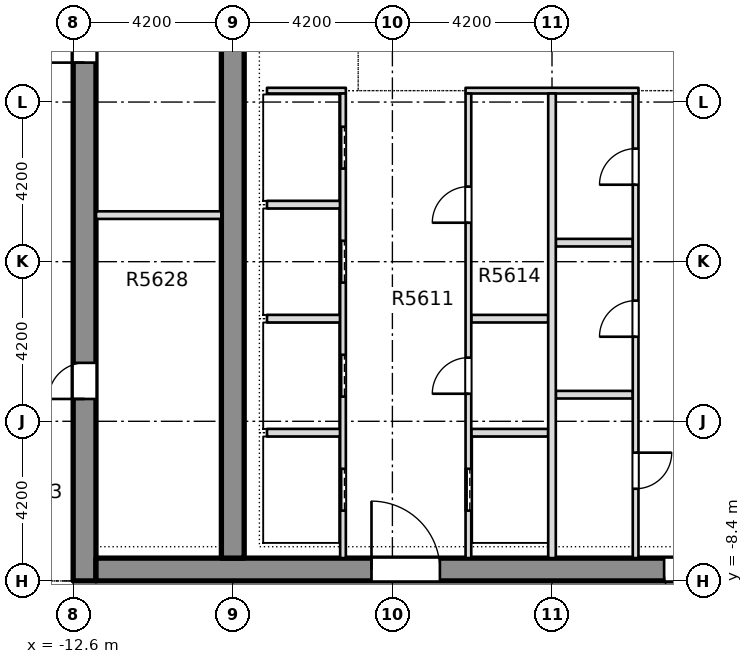
"""IFC4 building model, lengths in metres.
Left out: names, types, materials, properties, quantities, classifications, styles, units other than length and angle.
Written with IfcOpenShell. Run it as: python <this file> out.ifc"""

import sys

from ifc_helpers import new_model, si_unit, direction, frame, frame_2d, origin, place, context, subcontext, project, spatial, rectangle, extrude, element, fill, save


model = new_model("IFC4")
c1 = context("Model", 3, precision=1e-05, world=origin(), true_north=direction((0.0, 1.0)))
c2 = subcontext(c1, "Body", "Model", "MODEL_VIEW")
j1 = project(units=[si_unit("LENGTHUNIT", "METRE"), si_unit("PLANEANGLEUNIT", "RADIAN")], contexts=[c1])
p1 = place(None, origin())
s1 = spatial("IfcSite", under=j1, at=p1, CompositionType="ELEMENT")
p2 = place(p1, origin())
s2 = spatial("IfcBuilding", under=s1, at=p2, CompositionType="ELEMENT")
p3 = place(p2, frame((0.0, 0.0, 213.5)))
s3 = spatial("IfcBuildingStorey", under=s2, at=p3, CompositionType="ELEMENT", Elevation=213.5)
p4 = place(p3, frame((-12.3, -8.4, -0.4), z_axis=(0.0, 0.0, 1.0), x_axis=(0.0, 1.0, 0.0)))
e1 = element("IfcWall", 1, at=p4, inside=s3, PredefinedType="SHEAR", context=c2, shape_type="SweptSolid", body=[
    extrude(rectangle(XDim=30.15, YDim=0.6, at=frame_2d((15.075, 0.0))), origin(), (0.0, 0.0, 1.0), 3.4),
])
p5 = place(p4, frame((4.788, 0.0, 0.4)))
e2 = element("IfcOpeningElement", 2, at=p5, cuts=e1, PredefinedType="OPENING", context=c2, shape_type="SweptSolid", body=[
    extrude(rectangle(XDim=0.95, YDim=2.1, at=frame_2d((0.475, 1.05))), frame((0.0, 0.31, 0.0), z_axis=(0.0, -1.0, 0.0), x_axis=(1.0, 0.0, 0.0)), (0.0, 0.0, 1.0), 0.62),
])
p6 = place(p4, frame((13.638, 0.0, 0.4)))
e3 = element("IfcOpeningElement", 3, at=p6, cuts=e1, PredefinedType="OPENING", context=c2, shape_type="SweptSolid", body=[
    extrude(rectangle(XDim=0.95, YDim=2.1, at=frame_2d((0.475, 1.05))), frame((0.0, 0.31, 0.0), z_axis=(0.0, -1.0, 0.0), x_axis=(1.0, 0.0, 0.0)), (0.0, 0.0, 1.0), 0.62),
])
p7 = place(p4, frame((21.771, 0.0, 0.4)))
e4 = element("IfcOpeningElement", 4, at=p7, cuts=e1, PredefinedType="OPENING", context=c2, shape_type="SweptSolid", body=[
    extrude(rectangle(XDim=0.95, YDim=2.1, at=frame_2d((0.475, 1.05))), frame((0.0, 0.31, 0.0), z_axis=(0.0, -1.0, 0.0), x_axis=(1.0, 0.0, 0.0)), (0.0, 0.0, 1.0), 0.62),
])
p8 = place(p4, frame((24.576, 0.0, 0.4)))
e5 = element("IfcOpeningElement", 5, at=p8, cuts=e1, PredefinedType="OPENING", context=c2, shape_type="SweptSolid", body=[
    extrude(rectangle(XDim=0.95, YDim=2.1, at=frame_2d((0.475, 1.05))), frame((0.0, 0.31, 0.0), z_axis=(0.0, -1.0, 0.0), x_axis=(1.0, 0.0, 0.0)), (0.0, 0.0, 1.0), 0.62),
])
p9 = place(p4, frame((27.555, 0.0, 0.4)))
e6 = element("IfcOpeningElement", 6, at=p9, cuts=e1, PredefinedType="OPENING", context=c2, shape_type="SweptSolid", body=[
    extrude(rectangle(XDim=0.95, YDim=2.1, at=frame_2d((0.475, 1.05))), frame((0.0, 0.31, 0.0), z_axis=(0.0, -1.0, 0.0), x_axis=(1.0, 0.0, 0.0)), (0.0, 0.0, 1.0), 0.62),
])
p10 = place(p4, frame((19.3, 0.0, 0.4)))
e7 = element("IfcOpeningElement", 7, at=p10, cuts=e1, PredefinedType="OPENING", context=c2, shape_type="SweptSolid", body=[
    extrude(rectangle(XDim=1.2, YDim=2.1, at=frame_2d((0.6, 1.05))), frame((0.0, 0.31, 0.0), z_axis=(0.0, -1.0, 0.0), x_axis=(1.0, 0.0, 0.0)), (0.0, 0.0, 1.0), 0.62),
])
p11 = place(p3, frame((-12.0, -8.1, -0.4), z_axis=(0.0, 0.0, 1.0), x_axis=(1.0, 0.0, 0.0)))
e8 = element("IfcWall", 8, at=p11, inside=s3, PredefinedType="SHEAR", context=c2, shape_type="SweptSolid", body=[
    extrude(rectangle(XDim=24.0, YDim=0.6, at=frame_2d((12.0, 0.0))), origin(), (0.0, 0.0, 1.0), 3.4),
])
p12 = place(p11, frame((7.25, 0.0, 0.4)))
e9 = element("IfcOpeningElement", 9, at=p12, cuts=e8, PredefinedType="OPENING", context=c2, shape_type="SweptSolid", body=[
    extrude(rectangle(XDim=1.8, YDim=2.1, at=frame_2d((0.9, 1.05))), frame((0.0, 0.31, 0.0), z_axis=(0.0, -1.0, 0.0), x_axis=(1.0, 0.0, 0.0)), (0.0, 0.0, 1.0), 0.62),
])
p13 = place(p11, frame((14.95, 0.0, 0.4)))
e10 = element("IfcOpeningElement", 10, at=p13, cuts=e8, PredefinedType="OPENING", context=c2, shape_type="SweptSolid", body=[
    extrude(rectangle(XDim=1.8, YDim=2.1, at=frame_2d((0.9, 1.05))), frame((0.0, 0.31, 0.0), z_axis=(0.0, -1.0, 0.0), x_axis=(1.0, 0.0, 0.0)), (0.0, 0.0, 1.0), 0.62),
])
p14 = place(p3, frame((-8.4, -7.8, -0.4), z_axis=(0.0, 0.0, 1.0), x_axis=(0.0, 1.0, 0.0)))
e11 = element("IfcWall", 11, at=p14, inside=s3, PredefinedType="SHEAR", context=c2, shape_type="SweptSolid", body=[
    extrude(rectangle(XDim=28.95, YDim=0.6, at=frame_2d((14.475, 0.0))), origin(), (0.0, 0.0, 1.0), 3.4),
])
p15 = place(p14, frame((18.7, 0.0, 0.4)))
e12 = element("IfcOpeningElement", 12, at=p15, cuts=e11, PredefinedType="OPENING", context=c2, shape_type="SweptSolid", body=[
    extrude(rectangle(XDim=1.2, YDim=2.1, at=frame_2d((0.6, 1.05))), frame((0.0, 0.31, 0.0), z_axis=(0.0, -1.0, 0.0), x_axis=(1.0, 0.0, 0.0)), (0.0, 0.0, 1.0), 0.62),
])
p16 = place(p3, frame((-7.5, -4.5, 0.0), z_axis=(0.0, 0.0, 1.0), x_axis=(1.0, 0.0, 0.0)))
e13 = element("IfcWall", 13, at=p16, inside=s3, PredefinedType="PARTITIONING", context=c2, shape_type="SweptSolid", body=[
    extrude(rectangle(XDim=1.925, YDim=0.2, at=frame_2d((0.962, 0.0))), origin(), (0.0, 0.0, 1.0), 3.0),
])
for number, where, z_axis, x_axis in (
    (14, (-2.125, -4.5, 0.0), (0.0, 0.0, 1.0), (1.0, 0.0, 0.0)),
    (15, (0.1, -3.5, 0.0), (0.0, 0.0, 1.0), (1.0, 0.0, 0.0)),
):
    element("IfcWall", number, at=place(p3, frame(where, z_axis=z_axis, x_axis=x_axis)), inside=s3, PredefinedType="PARTITIONING", context=c2, shape_type="SweptSolid", body=[
        extrude(rectangle(XDim=2.025, YDim=0.2, at=frame_2d((1.012, 0.0))), origin(), (0.0, 0.0, 1.0), 3.0),
    ])
p17 = place(p3, frame((-7.5, -1.5, 0.0), z_axis=(0.0, 0.0, 1.0), x_axis=(1.0, 0.0, 0.0)))
e16 = element("IfcWall", 16, at=p17, inside=s3, PredefinedType="PARTITIONING", context=c2, shape_type="SweptSolid", body=[
    extrude(rectangle(XDim=1.925, YDim=0.2, at=frame_2d((0.962, 0.0))), origin(), (0.0, 0.0, 1.0), 3.0),
])
for number, where, z_axis, x_axis in (
    (17, (-2.125, -1.5, 0.0), (0.0, 0.0, 1.0), (1.0, 0.0, 0.0)),
    (18, (0.1, 0.5, 0.0), (0.0, 0.0, 1.0), (1.0, 0.0, 0.0)),
):
    element("IfcWall", number, at=place(p3, frame(where, z_axis=z_axis, x_axis=x_axis)), inside=s3, PredefinedType="PARTITIONING", context=c2, shape_type="SweptSolid", body=[
        extrude(rectangle(XDim=2.025, YDim=0.2, at=frame_2d((1.012, 0.0))), origin(), (0.0, 0.0, 1.0), 3.0),
    ])
p18 = place(p3, frame((-7.5, 1.5, 0.0), z_axis=(0.0, 0.0, 1.0), x_axis=(1.0, 0.0, 0.0)))
e19 = element("IfcWall", 19, at=p18, inside=s3, PredefinedType="PARTITIONING", context=c2, shape_type="SweptSolid", body=[
    extrude(rectangle(XDim=1.925, YDim=0.2, at=frame_2d((0.962, 0.0))), origin(), (0.0, 0.0, 1.0), 3.0),
])
p19 = place(p3, frame((-7.5, 4.5, 0.0), z_axis=(0.0, 0.0, 1.0), x_axis=(1.0, 0.0, 0.0)))
e20 = element("IfcWall", 20, at=p19, inside=s3, PredefinedType="PARTITIONING", context=c2, shape_type="SweptSolid", body=[
    extrude(rectangle(XDim=2.075, YDim=0.15, at=frame_2d((1.038, 0.0))), origin(), (0.0, 0.0, 1.0), 3.0),
])
p20 = place(p3, frame((-2.275, 4.5, 0.0), z_axis=(0.0, 0.0, 1.0), x_axis=(1.0, 0.0, 0.0)))
e21 = element("IfcWall", 21, at=p20, inside=s3, PredefinedType="PARTITIONING", context=c2, shape_type="SweptSolid", body=[
    extrude(rectangle(XDim=4.55, YDim=0.15, at=frame_2d((2.275, 0.0))), origin(), (0.0, 0.0, 1.0), 3.0),
])
p21 = place(p3, frame((-5.5, -7.799, 0.0), z_axis=(0.0, 0.0, 1.0), x_axis=(0.0, 1.0, 0.0)))
e22 = element("IfcWall", 22, at=p21, inside=s3, PredefinedType="PARTITIONING", context=c2, shape_type="SweptSolid", body=[
    extrude(rectangle(XDim=12.224, YDim=0.15, at=frame_2d((6.112, 0.0))), origin(), (0.0, 0.0, 1.0), 3.0),
])
p22 = place(p21, frame((1.249, 0.0, 0.0)))
e23 = element("IfcOpeningElement", 23, at=p22, cuts=e22, PredefinedType="OPENING", context=c2, shape_type="SweptSolid", body=[
    extrude(rectangle(XDim=1.1, YDim=2.1, at=frame_2d((0.55, 1.05))), frame((0.0, 0.085, 0.0), z_axis=(0.0, -1.0, 0.0), x_axis=(1.0, 0.0, 0.0)), (0.0, 0.0, 1.0), 0.17),
])
p23 = place(p21, frame((4.249, 0.0, 0.0)))
e24 = element("IfcOpeningElement", 24, at=p23, cuts=e22, PredefinedType="OPENING", context=c2, shape_type="SweptSolid", body=[
    extrude(rectangle(XDim=1.1, YDim=2.1, at=frame_2d((0.55, 1.05))), frame((0.0, 0.085, 0.0), z_axis=(0.0, -1.0, 0.0), x_axis=(1.0, 0.0, 0.0)), (0.0, 0.0, 1.0), 0.17),
])
p24 = place(p21, frame((7.249, 0.0, 0.0)))
e25 = element("IfcOpeningElement", 25, at=p24, cuts=e22, PredefinedType="OPENING", context=c2, shape_type="SweptSolid", body=[
    extrude(rectangle(XDim=1.1, YDim=2.1, at=frame_2d((0.55, 1.05))), frame((0.0, 0.085, 0.0), z_axis=(0.0, -1.0, 0.0), x_axis=(1.0, 0.0, 0.0)), (0.0, 0.0, 1.0), 0.17),
])
p25 = place(p21, frame((10.249, 0.0, 0.0)))
e26 = element("IfcOpeningElement", 26, at=p25, cuts=e22, PredefinedType="OPENING", context=c2, shape_type="SweptSolid", body=[
    extrude(rectangle(XDim=1.1, YDim=2.1, at=frame_2d((0.55, 1.05))), frame((0.0, 0.085, 0.0), z_axis=(0.0, -1.0, 0.0), x_axis=(1.0, 0.0, 0.0)), (0.0, 0.0, 1.0), 0.17),
])
p26 = place(p3, frame((-2.2, -7.799, 0.0), z_axis=(0.0, 0.0, 1.0), x_axis=(0.0, 1.0, 0.0)))
e27 = element("IfcWall", 27, at=p26, inside=s3, PredefinedType="PARTITIONING", context=c2, shape_type="SweptSolid", body=[
    extrude(rectangle(XDim=12.224, YDim=0.15, at=frame_2d((6.112, 0.0))), origin(), (0.0, 0.0, 1.0), 3.0),
])
p27 = place(p26, frame((1.249, 0.0, 0.0)))
e28 = element("IfcOpeningElement", 28, at=p27, cuts=e27, PredefinedType="OPENING", context=c2, shape_type="SweptSolid", body=[
    extrude(rectangle(XDim=1.1, YDim=2.1, at=frame_2d((0.55, 1.05))), frame((0.0, 0.085, 0.0), z_axis=(0.0, -1.0, 0.0), x_axis=(1.0, 0.0, 0.0)), (0.0, 0.0, 1.0), 0.17),
])
p28 = place(p26, frame((4.324, 0.0, 0.0)))
e29 = element("IfcOpeningElement", 29, at=p28, cuts=e27, PredefinedType="OPENING", context=c2, shape_type="SweptSolid", body=[
    extrude(rectangle(XDim=0.95, YDim=2.1, at=frame_2d((0.475, 1.05))), frame((0.0, 0.085, 0.0), z_axis=(0.0, -1.0, 0.0), x_axis=(1.0, 0.0, 0.0)), (0.0, 0.0, 1.0), 0.17),
])
p29 = place(p26, frame((8.824, 0.0, 0.0)))
e30 = element("IfcOpeningElement", 30, at=p29, cuts=e27, PredefinedType="OPENING", context=c2, shape_type="SweptSolid", body=[
    extrude(rectangle(XDim=0.95, YDim=2.1, at=frame_2d((0.475, 1.05))), frame((0.0, 0.085, 0.0), z_axis=(0.0, -1.0, 0.0), x_axis=(1.0, 0.0, 0.0)), (0.0, 0.0, 1.0), 0.17),
])
p30 = place(p3, frame((0.0, -7.799, 0.0), z_axis=(0.0, 0.0, 1.0), x_axis=(0.0, 1.0, 0.0)))
e31 = element("IfcWall", 31, at=p30, inside=s3, PredefinedType="PARTITIONING", context=c2, shape_type="SweptSolid", body=[
    extrude(rectangle(XDim=12.224, YDim=0.2, at=frame_2d((6.112, 0.0))), origin(), (0.0, 0.0, 1.0), 3.0),
])
p31 = place(p3, frame((2.2, -7.799, 0.0), z_axis=(0.0, 0.0, 1.0), x_axis=(0.0, 1.0, 0.0)))
e32 = element("IfcWall", 32, at=p31, inside=s3, PredefinedType="PARTITIONING", context=c2, shape_type="SweptSolid", body=[
    extrude(rectangle(XDim=12.224, YDim=0.15, at=frame_2d((6.112, 0.0))), origin(), (0.0, 0.0, 1.0), 3.0),
])
p32 = place(p31, frame((1.824, 0.0, 0.0)))
e33 = element("IfcOpeningElement", 33, at=p32, cuts=e32, PredefinedType="OPENING", context=c2, shape_type="SweptSolid", body=[
    extrude(rectangle(XDim=0.95, YDim=2.1, at=frame_2d((0.475, 1.05))), frame((0.0, 0.085, 0.0), z_axis=(0.0, -1.0, 0.0), x_axis=(1.0, 0.0, 0.0)), (0.0, 0.0, 1.0), 0.17),
])
p33 = place(p31, frame((5.824, 0.0, 0.0)))
e34 = element("IfcOpeningElement", 34, at=p33, cuts=e32, PredefinedType="OPENING", context=c2, shape_type="SweptSolid", body=[
    extrude(rectangle(XDim=0.95, YDim=2.1, at=frame_2d((0.475, 1.05))), frame((0.0, 0.085, 0.0), z_axis=(0.0, -1.0, 0.0), x_axis=(1.0, 0.0, 0.0)), (0.0, 0.0, 1.0), 0.17),
])
p34 = place(p31, frame((9.824, 0.0, 0.0)))
e35 = element("IfcOpeningElement", 35, at=p34, cuts=e32, PredefinedType="OPENING", context=c2, shape_type="SweptSolid", body=[
    extrude(rectangle(XDim=0.95, YDim=2.1, at=frame_2d((0.475, 1.05))), frame((0.0, 0.085, 0.0), z_axis=(0.0, -1.0, 0.0), x_axis=(1.0, 0.0, 0.0)), (0.0, 0.0, 1.0), 0.17),
])
p35 = place(p3, frame((-11.999, 1.225, 0.0), z_axis=(0.0, 0.0, 1.0), x_axis=(1.0, 0.0, 0.0)))
e36 = element("IfcWall", 36, at=p35, inside=s3, PredefinedType="PARTITIONING", context=c2, shape_type="SweptSolid", body=[
    extrude(rectangle(XDim=3.298, YDim=0.2, at=frame_2d((1.649, 0.0))), origin(), (0.0, 0.0, 1.0), 3.0),
])
p36 = place(p22, origin())
e37 = element("IfcDoor", 37, at=p36, inside=s3, OperationType="SLIDING_TO_LEFT", PredefinedType="DOOR", context=c2, shape_type="SweptSolid", body=[
    extrude(rectangle(XDim=1.1, YDim=2.1, at=frame_2d((0.55, 1.05))), frame((0.0, 0.025, 0.0), z_axis=(0.0, -1.0, 0.0), x_axis=(1.0, 0.0, 0.0)), (0.0, 0.0, 1.0), 0.05),
])
fill(e23, e37)
p37 = place(p23, origin())
e38 = element("IfcDoor", 38, at=p37, inside=s3, OperationType="SLIDING_TO_LEFT", PredefinedType="DOOR", context=c2, shape_type="SweptSolid", body=[
    extrude(rectangle(XDim=1.1, YDim=2.1, at=frame_2d((0.55, 1.05))), frame((0.0, 0.025, 0.0), z_axis=(0.0, -1.0, 0.0), x_axis=(1.0, 0.0, 0.0)), (0.0, 0.0, 1.0), 0.05),
])
fill(e24, e38)
p38 = place(p24, origin())
e39 = element("IfcDoor", 39, at=p38, inside=s3, OperationType="SLIDING_TO_LEFT", PredefinedType="DOOR", context=c2, shape_type="SweptSolid", body=[
    extrude(rectangle(XDim=1.1, YDim=2.1, at=frame_2d((0.55, 1.05))), frame((0.0, 0.025, 0.0), z_axis=(0.0, -1.0, 0.0), x_axis=(1.0, 0.0, 0.0)), (0.0, 0.0, 1.0), 0.05),
])
fill(e25, e39)
p39 = place(p25, origin())
e40 = element("IfcDoor", 40, at=p39, inside=s3, OperationType="SLIDING_TO_LEFT", PredefinedType="DOOR", context=c2, shape_type="SweptSolid", body=[
    extrude(rectangle(XDim=1.1, YDim=2.1, at=frame_2d((0.55, 1.05))), frame((0.0, 0.025, 0.0), z_axis=(0.0, -1.0, 0.0), x_axis=(1.0, 0.0, 0.0)), (0.0, 0.0, 1.0), 0.05),
])
fill(e26, e40)
p40 = place(p27, origin())
e41 = element("IfcDoor", 41, at=p40, inside=s3, OperationType="SLIDING_TO_LEFT", PredefinedType="DOOR", context=c2, shape_type="SweptSolid", body=[
    extrude(rectangle(XDim=1.1, YDim=2.1, at=frame_2d((0.55, 1.05))), frame((0.0, 0.025, 0.0), z_axis=(0.0, -1.0, 0.0), x_axis=(1.0, 0.0, 0.0)), (0.0, 0.0, 1.0), 0.05),
])
fill(e28, e41)
p41 = place(p28, origin())
e42 = element("IfcDoor", 42, at=p41, inside=s3, OperationType="SINGLE_SWING_RIGHT", PredefinedType="DOOR", context=c2, shape_type="SweptSolid", body=[
    extrude(rectangle(XDim=0.95, YDim=2.1, at=frame_2d((0.475, 1.05))), frame((0.0, 0.025, 0.0), z_axis=(0.0, -1.0, 0.0), x_axis=(1.0, 0.0, 0.0)), (0.0, 0.0, 1.0), 0.05),
])
fill(e29, e42)
p42 = place(p29, origin())
e43 = element("IfcDoor", 43, at=p42, inside=s3, OperationType="SINGLE_SWING_LEFT", PredefinedType="DOOR", context=c2, shape_type="SweptSolid", body=[
    extrude(rectangle(XDim=0.95, YDim=2.1, at=frame_2d((0.475, 1.05))), frame((0.0, 0.025, 0.0), z_axis=(0.0, -1.0, 0.0), x_axis=(1.0, 0.0, 0.0)), (0.0, 0.0, 1.0), 0.05),
])
fill(e30, e43)
p43 = place(p32, origin())
e44 = element("IfcDoor", 44, at=p43, inside=s3, OperationType="SINGLE_SWING_RIGHT", PredefinedType="DOOR", context=c2, shape_type="SweptSolid", body=[
    extrude(rectangle(XDim=0.95, YDim=2.1, at=frame_2d((0.475, 1.05))), frame((0.0, 0.025, 0.0), z_axis=(0.0, -1.0, 0.0), x_axis=(1.0, 0.0, 0.0)), (0.0, 0.0, 1.0), 0.05),
])
fill(e33, e44)
p44 = place(p33, origin())
e45 = element("IfcDoor", 45, at=p44, inside=s3, OperationType="SINGLE_SWING_RIGHT", PredefinedType="DOOR", context=c2, shape_type="SweptSolid", body=[
    extrude(rectangle(XDim=0.95, YDim=2.1, at=frame_2d((0.475, 1.05))), frame((0.0, 0.025, 0.0), z_axis=(0.0, -1.0, 0.0), x_axis=(1.0, 0.0, 0.0)), (0.0, 0.0, 1.0), 0.05),
])
fill(e34, e45)
p45 = place(p34, origin())
e46 = element("IfcDoor", 46, at=p45, inside=s3, OperationType="SINGLE_SWING_LEFT", PredefinedType="DOOR", context=c2, shape_type="SweptSolid", body=[
    extrude(rectangle(XDim=0.95, YDim=2.1, at=frame_2d((0.475, 1.05))), frame((0.0, 0.025, 0.0), z_axis=(0.0, -1.0, 0.0), x_axis=(1.0, 0.0, 0.0)), (0.0, 0.0, 1.0), 0.05),
])
fill(e35, e46)
p46 = place(p12, origin())
e47 = element("IfcDoor", 47, at=p46, inside=s3, OperationType="SINGLE_SWING_LEFT", PredefinedType="DOOR", context=c2, shape_type="SweptSolid", body=[
    extrude(rectangle(XDim=1.8, YDim=2.1, at=frame_2d((0.9, 1.05))), frame((0.0, 0.025, 0.0), z_axis=(0.0, -1.0, 0.0), x_axis=(1.0, 0.0, 0.0)), (0.0, 0.0, 1.0), 0.05),
])
fill(e9, e47)
p47 = place(p13, origin())
e48 = element("IfcDoor", 48, at=p47, inside=s3, OperationType="SINGLE_SWING_LEFT", PredefinedType="DOOR", context=c2, shape_type="SweptSolid", body=[
    extrude(rectangle(XDim=1.8, YDim=2.1, at=frame_2d((0.9, 1.05))), frame((0.0, 0.025, 0.0), z_axis=(0.0, -1.0, 0.0), x_axis=(1.0, 0.0, 0.0)), (0.0, 0.0, 1.0), 0.05),
])
fill(e10, e48)
p48 = place(p5, origin())
e49 = element("IfcDoor", 49, at=p48, inside=s3, OperationType="SINGLE_SWING_LEFT", PredefinedType="DOOR", context=c2, shape_type="SweptSolid", body=[
    extrude(rectangle(XDim=0.95, YDim=2.1, at=frame_2d((0.475, 1.05))), frame((0.0, 0.025, 0.0), z_axis=(0.0, -1.0, 0.0), x_axis=(1.0, 0.0, 0.0)), (0.0, 0.0, 1.0), 0.05),
])
fill(e2, e49)
p49 = place(p6, origin())
e50 = element("IfcDoor", 50, at=p49, inside=s3, OperationType="SINGLE_SWING_LEFT", PredefinedType="DOOR", context=c2, shape_type="SweptSolid", body=[
    extrude(rectangle(XDim=0.95, YDim=2.1, at=frame_2d((0.475, 1.05))), frame((0.0, 0.025, 0.0), z_axis=(0.0, -1.0, 0.0), x_axis=(1.0, 0.0, 0.0)), (0.0, 0.0, 1.0), 0.05),
])
fill(e3, e50)
save(model, sys.argv[1])
